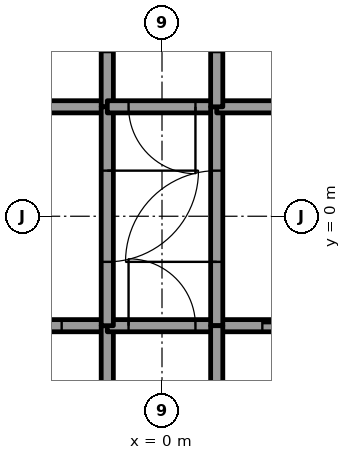
"""IFC4 building model, lengths in metres.
Left out: names, types, materials, properties, quantities, classifications, styles, units other than length and angle.
Written with IfcOpenShell. Run it as: python <this file> out.ifc"""

import sys

from ifc_helpers import new_model, si_unit, direction, frame, frame_2d, origin, place, context, subcontext, project, spatial, rectangle, extrude, element, fill, save


model = new_model("IFC4")
c1 = context("Model", 3, precision=1e-05, world=origin(), true_north=direction((0.0, 1.0)))
c2 = subcontext(c1, "Body", "Model", "MODEL_VIEW")
j1 = project(units=[si_unit("LENGTHUNIT", "METRE"), si_unit("PLANEANGLEUNIT", "RADIAN")], contexts=[c1])
p1 = place(None, origin())
s1 = spatial("IfcSite", under=j1, at=p1, CompositionType="ELEMENT")
p2 = place(p1, origin())
s2 = spatial("IfcBuilding", under=s1, at=p2, CompositionType="ELEMENT")
p3 = place(p2, frame((0.0, 0.0, 319.0)))
s3 = spatial("IfcBuildingStorey", under=s2, at=p3, CompositionType="ELEMENT", Elevation=319.0)
p4 = place(p3, frame((-3.5, -1.8, 0.0), z_axis=(0.0, 0.0, 1.0), x_axis=(1.0, 0.0, 0.0)))
e1 = element("IfcWall", 1, at=p4, inside=s3, PredefinedType="SOLIDWALL", context=c2, shape_type="SweptSolid", body=[
    extrude(rectangle(XDim=2.6, YDim=0.2, at=frame_2d((1.3, 0.0))), origin(), (0.0, 0.0, 1.0), 5.25),
])
p5 = place(p4, frame((0.75, 0.0, 0.0)))
e2 = element("IfcOpeningElement", 2, at=p5, cuts=e1, PredefinedType="OPENING", context=c2, shape_type="SweptSolid", body=[
    extrude(rectangle(XDim=1.1, YDim=2.1, at=frame_2d((0.55, 1.05))), frame((0.0, 0.1, 0.0), z_axis=(0.0, -1.0, 0.0), x_axis=(1.0, 0.0, 0.0)), (0.0, 0.0, 1.0), 0.2),
])
p6 = place(p3, frame((-0.9, 1.8, 0.0), z_axis=(0.0, 0.0, 1.0), x_axis=(-1.0, 0.0, 0.0)))
e3 = element("IfcWall", 3, at=p6, inside=s3, PredefinedType="SOLIDWALL", context=c2, shape_type="SweptSolid", body=[
    extrude(rectangle(XDim=2.6, YDim=0.2, at=frame_2d((1.3, 0.0))), origin(), (0.0, 0.0, 1.0), 5.25),
])
p7 = place(p3, frame((-0.9, 1.8, 0.0), z_axis=(0.0, 0.0, 1.0), x_axis=(0.0, 1.0, 0.0)))
e4 = element("IfcWall", 4, at=p7, inside=s3, PredefinedType="SOLIDWALL", context=c2, shape_type="SweptSolid", body=[
    extrude(rectangle(XDim=3.0, YDim=0.2, at=frame_2d((1.5, 0.0))), origin(), (0.0, 0.0, 1.0), 5.25),
])
p8 = place(p7, frame((0.9, 0.0, 0.0)))
e5 = element("IfcOpeningElement", 5, at=p8, cuts=e4, PredefinedType="OPENING", context=c2, shape_type="SweptSolid", body=[
    extrude(rectangle(XDim=1.2, YDim=2.1, at=frame_2d((0.6, 1.05))), frame((0.0, 0.1, 0.0), z_axis=(0.0, -1.0, 0.0), x_axis=(1.0, 0.0, 0.0)), (0.0, 0.0, 1.0), 0.2),
])
p9 = place(p3, frame((-0.9, -4.6, 0.0), z_axis=(0.0, 0.0, 1.0), x_axis=(0.0, 1.0, 0.0)))
e6 = element("IfcWall", 6, at=p9, inside=s3, PredefinedType="SOLIDWALL", context=c2, shape_type="SweptSolid", body=[
    extrude(rectangle(XDim=2.8, YDim=0.2, at=frame_2d((1.4, 0.0))), origin(), (0.0, 0.0, 1.0), 5.25),
])
p10 = place(p3, frame((-0.9, -1.8, 0.0), z_axis=(0.0, 0.0, 1.0), x_axis=(1.0, 0.0, 0.0)))
e7 = element("IfcWall", 7, at=p10, inside=s3, PredefinedType="SOLIDWALL", context=c2, shape_type="SweptSolid", body=[
    extrude(rectangle(XDim=1.8, YDim=0.2, at=frame_2d((0.9, 0.0))), origin(), (0.0, 0.0, 1.0), 5.25),
])
p11 = place(p10, frame((0.35, 0.0, 0.0)))
e8 = element("IfcOpeningElement", 8, at=p11, cuts=e7, PredefinedType="OPENING", context=c2, shape_type="SweptSolid", body=[
    extrude(rectangle(XDim=1.1, YDim=2.1, at=frame_2d((0.55, 1.05))), frame((0.0, 0.1, 0.0), z_axis=(0.0, -1.0, 0.0), x_axis=(1.0, 0.0, 0.0)), (0.0, 0.0, 1.0), 0.2),
])
p12 = place(p3, frame((-0.9, 1.8, 0.0), z_axis=(0.0, 0.0, 1.0), x_axis=(0.0, -1.0, 0.0)))
e9 = element("IfcWall", 9, at=p12, inside=s3, PredefinedType="SOLIDWALL", context=c2, shape_type="SweptSolid", body=[
    extrude(rectangle(XDim=3.6, YDim=0.2, at=frame_2d((1.8, 0.0))), origin(), (0.0, 0.0, 1.0), 5.25),
])
p13 = place(p12, frame((1.05, 0.0, 0.0)))
e10 = element("IfcOpeningElement", 10, at=p13, cuts=e9, PredefinedType="OPENING", context=c2, shape_type="SweptSolid", body=[
    extrude(rectangle(XDim=1.5, YDim=2.1, at=frame_2d((0.75, 1.05))), frame((0.0, 0.1, 0.0), z_axis=(0.0, -1.0, 0.0), x_axis=(1.0, 0.0, 0.0)), (0.0, 0.0, 1.0), 0.2),
])
p14 = place(p3, frame((0.9, 1.8, 0.0), z_axis=(0.0, 0.0, 1.0), x_axis=(-1.0, 0.0, 0.0)))
e11 = element("IfcWall", 11, at=p14, inside=s3, PredefinedType="SOLIDWALL", context=c2, shape_type="SweptSolid", body=[
    extrude(rectangle(XDim=1.8, YDim=0.2, at=frame_2d((0.9, 0.0))), origin(), (0.0, 0.0, 1.0), 5.25),
])
p15 = place(p14, frame((0.35, 0.0, 0.0)))
e12 = element("IfcOpeningElement", 12, at=p15, cuts=e11, PredefinedType="OPENING", context=c2, shape_type="SweptSolid", body=[
    extrude(rectangle(XDim=1.1, YDim=2.1, at=frame_2d((0.55, 1.05))), frame((0.0, 0.1, 0.0), z_axis=(0.0, -1.0, 0.0), x_axis=(1.0, 0.0, 0.0)), (0.0, 0.0, 1.0), 0.2),
])
p16 = place(p3, frame((0.9, -1.8, 0.0), z_axis=(0.0, 0.0, 1.0), x_axis=(1.0, 0.0, 0.0)))
e13 = element("IfcWall", 13, at=p16, inside=s3, PredefinedType="SOLIDWALL", context=c2, shape_type="SweptSolid", body=[
    extrude(rectangle(XDim=2.6, YDim=0.2, at=frame_2d((1.3, 0.0))), origin(), (0.0, 0.0, 1.0), 5.25),
])
p17 = place(p16, frame((0.75, 0.0, 0.0)))
e14 = element("IfcOpeningElement", 14, at=p17, cuts=e13, PredefinedType="OPENING", context=c2, shape_type="SweptSolid", body=[
    extrude(rectangle(XDim=1.1, YDim=2.1, at=frame_2d((0.55, 1.05))), frame((0.0, 0.1, 0.0), z_axis=(0.0, -1.0, 0.0), x_axis=(1.0, 0.0, 0.0)), (0.0, 0.0, 1.0), 0.2),
])
p18 = place(p3, frame((0.9, -1.8, 0.0), z_axis=(0.0, 0.0, 1.0), x_axis=(0.0, 1.0, 0.0)))
e15 = element("IfcWall", 15, at=p18, inside=s3, PredefinedType="SOLIDWALL", context=c2, shape_type="SweptSolid", body=[
    extrude(rectangle(XDim=3.6, YDim=0.2, at=frame_2d((1.8, 0.0))), origin(), (0.0, 0.0, 1.0), 5.25),
])
p19 = place(p18, frame((1.05, 0.0, 0.0)))
e16 = element("IfcOpeningElement", 16, at=p19, cuts=e15, PredefinedType="OPENING", context=c2, shape_type="SweptSolid", body=[
    extrude(rectangle(XDim=1.5, YDim=2.1, at=frame_2d((0.75, 1.05))), frame((0.0, 0.1, 0.0), z_axis=(0.0, -1.0, 0.0), x_axis=(1.0, 0.0, 0.0)), (0.0, 0.0, 1.0), 0.2),
])
p20 = place(p3, frame((0.9, -1.8, 0.0), z_axis=(0.0, 0.0, 1.0), x_axis=(0.0, -1.0, 0.0)))
e17 = element("IfcWall", 17, at=p20, inside=s3, PredefinedType="SOLIDWALL", context=c2, shape_type="SweptSolid", body=[
    extrude(rectangle(XDim=2.8, YDim=0.2, at=frame_2d((1.4, 0.0))), origin(), (0.0, 0.0, 1.0), 5.25),
])
p21 = place(p3, frame((3.5, 1.8, 0.0), z_axis=(0.0, 0.0, 1.0), x_axis=(-1.0, 0.0, 0.0)))
e18 = element("IfcWall", 18, at=p21, inside=s3, PredefinedType="SOLIDWALL", context=c2, shape_type="SweptSolid", body=[
    extrude(rectangle(XDim=2.6, YDim=0.2, at=frame_2d((1.3, 0.0))), origin(), (0.0, 0.0, 1.0), 5.25),
])
p22 = place(p3, frame((0.9, 4.8, 0.0), z_axis=(0.0, 0.0, 1.0), x_axis=(0.0, -1.0, 0.0)))
e19 = element("IfcWall", 19, at=p22, inside=s3, PredefinedType="SOLIDWALL", context=c2, shape_type="SweptSolid", body=[
    extrude(rectangle(XDim=3.0, YDim=0.2, at=frame_2d((1.5, 0.0))), origin(), (0.0, 0.0, 1.0), 5.25),
])
p23 = place(p22, frame((0.9, 0.0, 0.0)))
e20 = element("IfcOpeningElement", 20, at=p23, cuts=e19, PredefinedType="OPENING", context=c2, shape_type="SweptSolid", body=[
    extrude(rectangle(XDim=1.2, YDim=2.1, at=frame_2d((0.6, 1.05))), frame((0.0, 0.1, 0.0), z_axis=(0.0, -1.0, 0.0), x_axis=(1.0, 0.0, 0.0)), (0.0, 0.0, 1.0), 0.2),
])
p24 = place(p5, origin())
e21 = element("IfcDoor", 21, at=p24, inside=s3, OperationType="SLIDING_TO_LEFT", PredefinedType="DOOR", context=c2, shape_type="SweptSolid", body=[
    extrude(rectangle(XDim=1.1, YDim=2.1, at=frame_2d((0.55, 1.05))), frame((0.0, 0.025, 0.0), z_axis=(0.0, -1.0, 0.0), x_axis=(1.0, 0.0, 0.0)), (0.0, 0.0, 1.0), 0.05),
])
fill(e2, e21)
p25 = place(p17, origin())
e22 = element("IfcDoor", 22, at=p25, inside=s3, OperationType="SLIDING_TO_RIGHT", PredefinedType="DOOR", context=c2, shape_type="SweptSolid", body=[
    extrude(rectangle(XDim=1.1, YDim=2.1, at=frame_2d((0.55, 1.05))), frame((0.0, 0.025, 0.0), z_axis=(0.0, -1.0, 0.0), x_axis=(1.0, 0.0, 0.0)), (0.0, 0.0, 1.0), 0.05),
])
fill(e14, e22)
p26 = place(p13, origin())
e23 = element("IfcDoor", 23, at=p26, inside=s3, OperationType="DOUBLE_DOOR_SINGLE_SWING", PredefinedType="DOOR", context=c2, shape_type="SweptSolid", body=[
    extrude(rectangle(XDim=1.5, YDim=2.1, at=frame_2d((0.75, 1.05))), frame((0.0, 0.025, 0.0), z_axis=(0.0, -1.0, 0.0), x_axis=(1.0, 0.0, 0.0)), (0.0, 0.0, 1.0), 0.05),
])
fill(e10, e23)
p27 = place(p19, origin())
e24 = element("IfcDoor", 24, at=p27, inside=s3, OperationType="DOUBLE_DOOR_SINGLE_SWING", PredefinedType="DOOR", context=c2, shape_type="SweptSolid", body=[
    extrude(rectangle(XDim=1.5, YDim=2.1, at=frame_2d((0.75, 1.05))), frame((0.0, 0.025, 0.0), z_axis=(0.0, -1.0, 0.0), x_axis=(1.0, 0.0, 0.0)), (0.0, 0.0, 1.0), 0.05),
])
fill(e16, e24)
p28 = place(p15, origin())
e25 = element("IfcDoor", 25, at=p28, inside=s3, OperationType="SINGLE_SWING_RIGHT", PredefinedType="DOOR", context=c2, shape_type="SweptSolid", body=[
    extrude(rectangle(XDim=1.1, YDim=2.1, at=frame_2d((0.55, 1.05))), frame((0.0, 0.025, 0.0), z_axis=(0.0, -1.0, 0.0), x_axis=(1.0, 0.0, 0.0)), (0.0, 0.0, 1.0), 0.05),
])
fill(e12, e25)
p29 = place(p11, origin())
e26 = element("IfcDoor", 26, at=p29, inside=s3, OperationType="SINGLE_SWING_LEFT", PredefinedType="DOOR", context=c2, shape_type="SweptSolid", body=[
    extrude(rectangle(XDim=1.1, YDim=2.1, at=frame_2d((0.55, 1.05))), frame((0.0, 0.025, 0.0), z_axis=(0.0, -1.0, 0.0), x_axis=(1.0, 0.0, 0.0)), (0.0, 0.0, 1.0), 0.05),
])
fill(e8, e26)
save(model, sys.argv[1])
